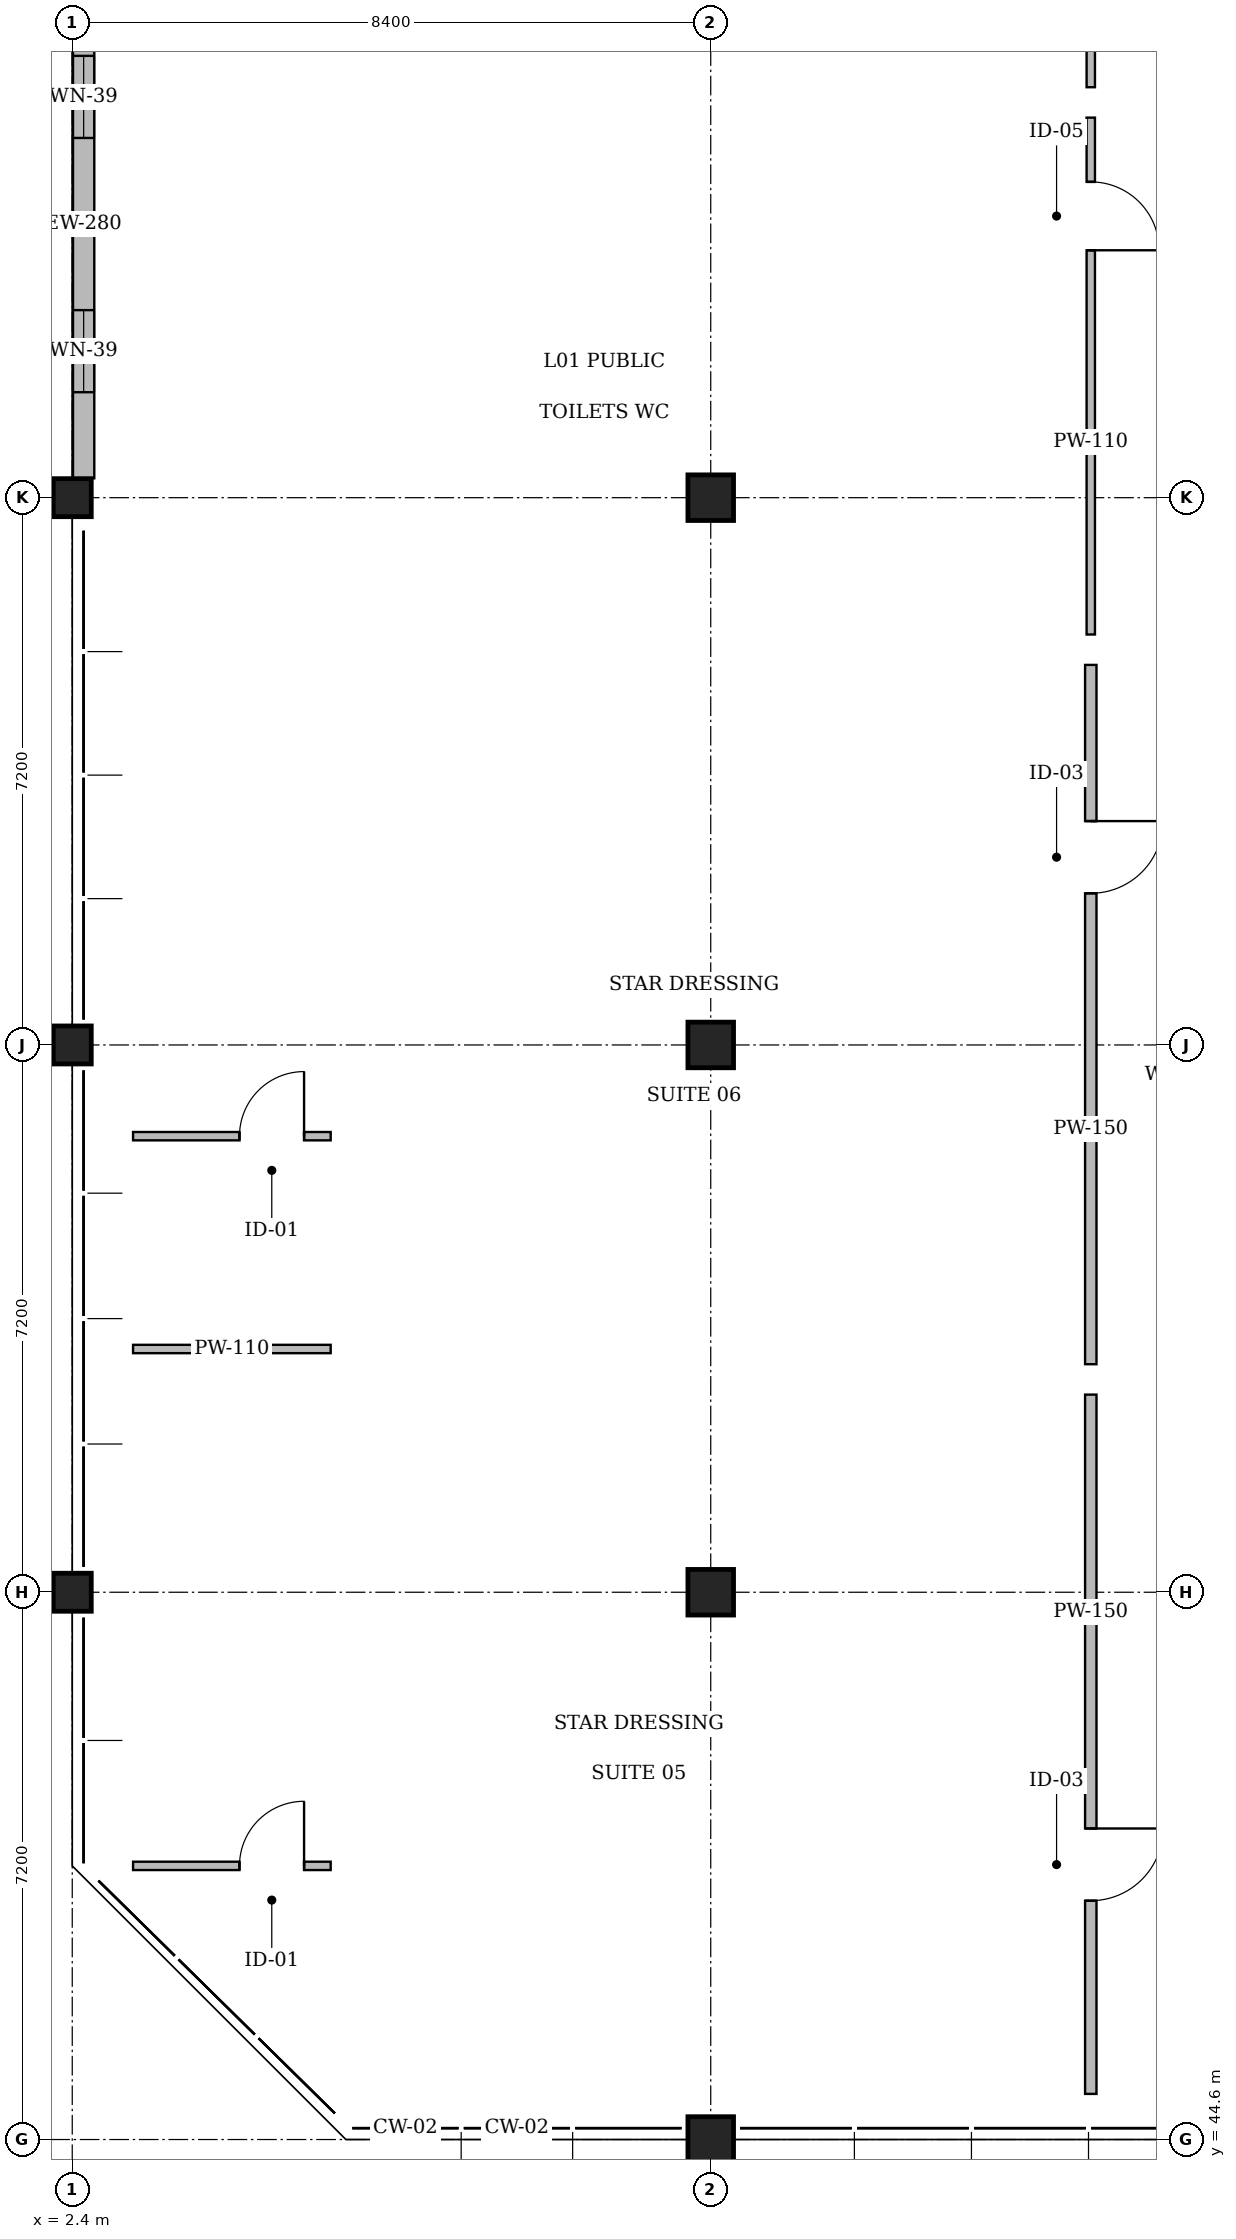
"""IFC4 building model, lengths in metres.
Left out: names, types, materials, properties, quantities, classifications, styles, units other than length and angle.
Written with IfcOpenShell. Run it as: python <this file> out.ifc"""

import sys

from ifc_helpers import new_model, si_unit, direction, frame, frame_2d, origin, origin_2d, place, context, subcontext, project, spatial, rectangle, extrude, element, fill, save


model = new_model("IFC4")
c1 = context("Model", 3, precision=1e-05, world=origin(), true_north=direction((0.0, 1.0)))
c2 = subcontext(c1, "Body", "Model", "MODEL_VIEW")
j1 = project(units=[si_unit("LENGTHUNIT", "METRE"), si_unit("PLANEANGLEUNIT", "RADIAN")], contexts=[c1])
p1 = place(None, origin())
s1 = spatial("IfcSite", under=j1, at=p1, CompositionType="ELEMENT")
p2 = place(p1, origin())
s2 = spatial("IfcBuilding", under=s1, at=p2, CompositionType="ELEMENT")
p3 = place(p2, frame((0.0, 0.0, 4.8)))
s3 = spatial("IfcBuildingStorey", under=s2, at=p3, CompositionType="ELEMENT", Elevation=4.8)
for number, where, z_axis, x_axis in (
    (1, (2.4, 51.8, 0.0), (0.0, 0.0, 1.0), (1.0, 0.0, 0.0)),
    (2, (2.4, 59.0, 0.0), (0.0, 0.0, 1.0), (1.0, 0.0, 0.0)),
    (3, (2.4, 66.2, 0.0), (0.0, 0.0, 1.0), (1.0, 0.0, 0.0)),
):
    element("IfcColumn", number, at=place(p3, frame(where, z_axis=z_axis, x_axis=x_axis)), inside=s3, PredefinedType="COLUMN", context=c2, shape_type="SweptSolid", body=[
        extrude(rectangle(XDim=0.5, YDim=0.5, at=origin_2d()), origin(), (0.0, 0.0, 1.0), 4.2),
    ])
for number, where, z_axis, x_axis in (
    (4, (10.8, 44.6, 0.0), (0.0, 0.0, 1.0), (1.0, 0.0, 0.0)),
    (5, (10.8, 51.8, 0.0), (0.0, 0.0, 1.0), (1.0, 0.0, 0.0)),
    (6, (10.8, 59.0, 0.0), (0.0, 0.0, 1.0), (1.0, 0.0, 0.0)),
    (7, (10.8, 66.2, 0.0), (0.0, 0.0, 1.0), (1.0, 0.0, 0.0)),
):
    element("IfcColumn", number, at=place(p3, frame(where, z_axis=z_axis, x_axis=x_axis)), inside=s3, PredefinedType="COLUMN", context=c2, shape_type="SweptSolid", body=[
        extrude(rectangle(XDim=0.6, YDim=0.6, at=origin_2d()), origin(), (0.0, 0.0, 1.0), 4.2),
    ])
p4 = place(p3, frame((2.55, 66.455, 0.0), z_axis=(0.0, 0.0, 1.0), x_axis=(0.0, 1.0, 0.0)))
e8 = element("IfcWall", 8, at=p4, inside=s3, PredefinedType="SOLIDWALL", context=c2, shape_type="SweptSolid", body=[
    extrude(rectangle(XDim=6.69, YDim=0.28, at=frame_2d((3.345, 0.0))), origin(), (0.0, 0.0, 1.0), 3.653),
])
p5 = place(p4, frame((1.133, 0.0, 0.95)))
e9 = element("IfcOpeningElement", 9, at=p5, cuts=e8, PredefinedType="OPENING", context=c2, shape_type="SweptSolid", body=[
    extrude(rectangle(XDim=1.08, YDim=1.6, at=frame_2d((0.54, 0.8))), frame((0.0, 0.16, 0.0), z_axis=(0.0, -1.0, 0.0), x_axis=(1.0, 0.0, 0.0)), (0.0, 0.0, 1.0), 0.32),
])
p6 = place(p4, frame((4.478, 0.0, 0.95)))
e10 = element("IfcOpeningElement", 10, at=p6, cuts=e8, PredefinedType="OPENING", context=c2, shape_type="SweptSolid", body=[
    extrude(rectangle(XDim=1.08, YDim=1.6, at=frame_2d((0.54, 0.8))), frame((0.0, 0.16, 0.0), z_axis=(0.0, -1.0, 0.0), x_axis=(1.0, 0.0, 0.0)), (0.0, 0.0, 1.0), 0.32),
])
p7 = place(p3, frame((3.2, 48.2, 0.0), z_axis=(0.0, 0.0, 1.0), x_axis=(1.0, 0.0, 0.0)))
e11 = element("IfcWall", 11, at=p7, inside=s3, PredefinedType="PARTITIONING", context=c2, shape_type="SweptSolid", body=[
    extrude(rectangle(XDim=2.6, YDim=0.11, at=frame_2d((1.3, 0.0))), origin(), (0.0, 0.0, 1.0), 3.94),
])
p8 = place(p7, frame((1.4, 0.0, 0.0)))
e12 = element("IfcOpeningElement", 12, at=p8, cuts=e11, PredefinedType="OPENING", context=c2, shape_type="SweptSolid", body=[
    extrude(rectangle(XDim=0.85, YDim=2.1, at=frame_2d((0.425, 1.05))), frame((0.0, 0.075, 0.0), z_axis=(0.0, -1.0, 0.0), x_axis=(1.0, 0.0, 0.0)), (0.0, 0.0, 1.0), 0.15),
])
p9 = place(p3, frame((15.8, 54.4, 0.0), z_axis=(0.0, 0.0, 1.0), x_axis=(0.0, -1.0, 0.0)))
e13 = element("IfcWall", 13, at=p9, inside=s3, PredefinedType="PARTITIONING", context=c2, shape_type="SweptSolid", body=[
    extrude(rectangle(XDim=9.2, YDim=0.15, at=frame_2d((4.6, 0.0))), origin(), (0.0, 0.0, 1.0), 3.94),
])
p10 = place(p9, frame((5.708, 0.0, 0.0)))
e14 = element("IfcOpeningElement", 14, at=p10, cuts=e13, PredefinedType="OPENING", context=c2, shape_type="SweptSolid", body=[
    extrude(rectangle(XDim=0.95, YDim=2.2, at=frame_2d((0.475, 1.1))), frame((0.0, 0.095, 0.0), z_axis=(0.0, -1.0, 0.0), x_axis=(1.0, 0.0, 0.0)), (0.0, 0.0, 1.0), 0.19),
])
p11 = place(p3, frame((3.2, 57.8, 0.0), z_axis=(0.0, 0.0, 1.0), x_axis=(1.0, 0.0, 0.0)))
e15 = element("IfcWall", 15, at=p11, inside=s3, PredefinedType="PARTITIONING", context=c2, shape_type="SweptSolid", body=[
    extrude(rectangle(XDim=2.6, YDim=0.11, at=frame_2d((1.3, 0.0))), origin(), (0.0, 0.0, 1.0), 3.94),
])
p12 = place(p11, frame((1.4, 0.0, 0.0)))
e16 = element("IfcOpeningElement", 16, at=p12, cuts=e15, PredefinedType="OPENING", context=c2, shape_type="SweptSolid", body=[
    extrude(rectangle(XDim=0.85, YDim=2.1, at=frame_2d((0.425, 1.05))), frame((0.0, 0.075, 0.0), z_axis=(0.0, -1.0, 0.0), x_axis=(1.0, 0.0, 0.0)), (0.0, 0.0, 1.0), 0.15),
])
p13 = place(p3, frame((5.8, 55.0, 0.0), z_axis=(0.0, 0.0, 1.0), x_axis=(-1.0, 0.0, 0.0)))
e17 = element("IfcWall", 17, at=p13, inside=s3, PredefinedType="PARTITIONING", context=c2, shape_type="SweptSolid", body=[
    extrude(rectangle(XDim=2.6, YDim=0.11, at=frame_2d((1.3, 0.0))), origin(), (0.0, 0.0, 1.0), 3.94),
])
p14 = place(p3, frame((15.8, 64.0, 0.0), z_axis=(0.0, 0.0, 1.0), x_axis=(0.0, -1.0, 0.0)))
e18 = element("IfcWall", 18, at=p14, inside=s3, PredefinedType="PARTITIONING", context=c2, shape_type="SweptSolid", body=[
    extrude(rectangle(XDim=9.2, YDim=0.15, at=frame_2d((4.6, 0.0))), origin(), (0.0, 0.0, 1.0), 3.94),
])
p15 = place(p14, frame((2.055, 0.0, 0.0)))
e19 = element("IfcOpeningElement", 19, at=p15, cuts=e18, PredefinedType="OPENING", context=c2, shape_type="SweptSolid", body=[
    extrude(rectangle(XDim=0.95, YDim=2.2, at=frame_2d((0.475, 1.1))), frame((0.0, 0.095, 0.0), z_axis=(0.0, -1.0, 0.0), x_axis=(1.0, 0.0, 0.0)), (0.0, 0.0, 1.0), 0.19),
])
p16 = place(p3, frame((15.8, 71.2, 0.0), z_axis=(0.0, 0.0, 1.0), x_axis=(0.0, -1.0, 0.0)))
e20 = element("IfcWall", 20, at=p16, inside=s3, PredefinedType="PARTITIONING", context=c2, shape_type="SweptSolid", body=[
    extrude(rectangle(XDim=6.8, YDim=0.11, at=frame_2d((3.4, 0.0))), origin(), (0.0, 0.0, 1.0), 3.94),
])
p17 = place(p16, frame((0.845, 0.0, 0.0)))
e21 = element("IfcOpeningElement", 21, at=p17, cuts=e20, PredefinedType="OPENING", context=c2, shape_type="SweptSolid", body=[
    extrude(rectangle(XDim=0.9, YDim=2.15, at=frame_2d((0.45, 1.075))), frame((0.0, 0.075, 0.0), z_axis=(0.0, -1.0, 0.0), x_axis=(1.0, 0.0, 0.0)), (0.0, 0.0, 1.0), 0.15),
])
p18 = place(p3, frame((15.8, 76.4, 0.0), z_axis=(0.0, 0.0, 1.0), x_axis=(0.0, -1.0, 0.0)))
e22 = element("IfcWall", 22, at=p18, inside=s3, PredefinedType="PARTITIONING", context=c2, shape_type="SweptSolid", body=[
    extrude(rectangle(XDim=4.8, YDim=0.11, at=frame_2d((2.4, 0.0))), origin(), (0.0, 0.0, 1.0), 3.94),
])
p19 = place(p18, frame((0.35, 0.0, 0.0)))
e23 = element("IfcOpeningElement", 23, at=p19, cuts=e22, PredefinedType="OPENING", context=c2, shape_type="SweptSolid", body=[
    extrude(rectangle(XDim=0.95, YDim=2.1, at=frame_2d((0.475, 1.05))), frame((0.0, 0.075, 0.0), z_axis=(0.0, -1.0, 0.0), x_axis=(1.0, 0.0, 0.0)), (0.0, 0.0, 1.0), 0.15),
])
p20 = place(p5, origin())
e24 = element("IfcWindow", 24, at=p20, inside=s3, PartitioningType="SINGLE_PANEL", PredefinedType="WINDOW", context=c2, shape_type="SweptSolid", body=[
    extrude(rectangle(XDim=1.08, YDim=1.6, at=frame_2d((0.54, 0.8))), frame((0.0, 0.03, 0.0), z_axis=(0.0, -1.0, 0.0), x_axis=(1.0, 0.0, 0.0)), (0.0, 0.0, 1.0), 0.06),
])
fill(e9, e24)
p21 = place(p6, origin())
e25 = element("IfcWindow", 25, at=p21, inside=s3, PartitioningType="SINGLE_PANEL", PredefinedType="WINDOW", context=c2, shape_type="SweptSolid", body=[
    extrude(rectangle(XDim=1.08, YDim=1.6, at=frame_2d((0.54, 0.8))), frame((0.0, 0.03, 0.0), z_axis=(0.0, -1.0, 0.0), x_axis=(1.0, 0.0, 0.0)), (0.0, 0.0, 1.0), 0.06),
])
fill(e10, e25)
p22 = place(p8, origin())
e26 = element("IfcDoor", 26, at=p22, inside=s3, OperationType="SINGLE_SWING_RIGHT", PredefinedType="DOOR", context=c2, shape_type="SweptSolid", body=[
    extrude(rectangle(XDim=0.85, YDim=2.1, at=frame_2d((0.425, 1.05))), frame((0.0, 0.025, 0.0), z_axis=(0.0, -1.0, 0.0), x_axis=(1.0, 0.0, 0.0)), (0.0, 0.0, 1.0), 0.05),
])
fill(e12, e26)
p23 = place(p10, origin())
e27 = element("IfcDoor", 27, at=p23, inside=s3, OperationType="SINGLE_SWING_LEFT", PredefinedType="DOOR", context=c2, shape_type="SweptSolid", body=[
    extrude(rectangle(XDim=0.95, YDim=2.2, at=frame_2d((0.475, 1.1))), frame((0.0, 0.025, 0.0), z_axis=(0.0, -1.0, 0.0), x_axis=(1.0, 0.0, 0.0)), (0.0, 0.0, 1.0), 0.05),
])
fill(e14, e27)
p24 = place(p12, origin())
e28 = element("IfcDoor", 28, at=p24, inside=s3, OperationType="SINGLE_SWING_RIGHT", PredefinedType="DOOR", context=c2, shape_type="SweptSolid", body=[
    extrude(rectangle(XDim=0.85, YDim=2.1, at=frame_2d((0.425, 1.05))), frame((0.0, 0.025, 0.0), z_axis=(0.0, -1.0, 0.0), x_axis=(1.0, 0.0, 0.0)), (0.0, 0.0, 1.0), 0.05),
])
fill(e16, e28)
p25 = place(p15, origin())
e29 = element("IfcDoor", 29, at=p25, inside=s3, OperationType="SINGLE_SWING_LEFT", PredefinedType="DOOR", context=c2, shape_type="SweptSolid", body=[
    extrude(rectangle(XDim=0.95, YDim=2.2, at=frame_2d((0.475, 1.1))), frame((0.0, 0.025, 0.0), z_axis=(0.0, -1.0, 0.0), x_axis=(1.0, 0.0, 0.0)), (0.0, 0.0, 1.0), 0.05),
])
fill(e19, e29)
p26 = place(p17, origin())
e30 = element("IfcDoor", 30, at=p26, inside=s3, OperationType="SINGLE_SWING_RIGHT", PredefinedType="DOOR", context=c2, shape_type="SweptSolid", body=[
    extrude(rectangle(XDim=0.9, YDim=2.15, at=frame_2d((0.45, 1.075))), frame((0.0, 0.025, 0.0), z_axis=(0.0, -1.0, 0.0), x_axis=(1.0, 0.0, 0.0)), (0.0, 0.0, 1.0), 0.05),
])
fill(e21, e30)
save(model, sys.argv[1])
